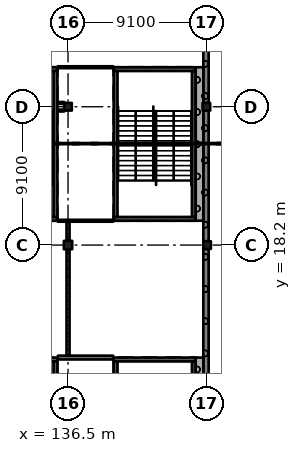
"""IFC4 building model, lengths in metres.
Left out: names, types, materials, properties, quantities, classifications, styles, units other than length and angle.
Written with IfcOpenShell. Run it as: python <this file> out.ifc"""

import sys

from ifc_helpers import new_model, si_unit, direction, frame, frame_2d, origin, origin_2d, place, context, subcontext, project, spatial, rectangle, extrude, element, fill, save


model = new_model("IFC4")
c1 = context("Model", 3, precision=1e-05, world=origin(), true_north=direction((0.0, 1.0)))
c2 = subcontext(c1, "Body", "Model", "MODEL_VIEW")
j1 = project(units=[si_unit("LENGTHUNIT", "METRE"), si_unit("PLANEANGLEUNIT", "RADIAN")], contexts=[c1])
p1 = place(None, origin())
s1 = spatial("IfcSite", under=j1, at=p1, CompositionType="ELEMENT")
p2 = place(p1, origin())
s2 = spatial("IfcBuilding", under=s1, at=p2, CompositionType="ELEMENT")
p3 = place(p2, frame((0.0, 0.0, 20.02)))
s3 = spatial("IfcBuildingStorey", under=s2, at=p3, CompositionType="ELEMENT", Elevation=20.02)
p4 = place(p3, frame((136.5, 18.2, 0.0), z_axis=(0.0, 0.0, 1.0), x_axis=(1.0, 0.0, 0.0)))
e1 = element("IfcColumn", 1, at=p4, inside=s3, PredefinedType="COLUMN", context=c2, shape_type="SweptSolid", body=[
    extrude(rectangle(XDim=0.55, YDim=0.55, at=origin_2d()), origin(), (0.0, 0.0, 1.0), 4.55),
])
for number, where, z_axis, x_axis in (
    (2, (136.5, 27.3, 0.0), (0.0, 0.0, 1.0), (1.0, 0.0, 0.0)),
    (3, (145.65, 18.2, 0.0), (0.0, 0.0, 1.0), (1.0, 0.0, 0.0)),
    (4, (145.6, 27.3, 0.0), (0.0, 0.0, 1.0), (1.0, 0.0, 0.0)),
):
    element("IfcColumn", number, at=place(p3, frame(where, z_axis=z_axis, x_axis=x_axis)), inside=s3, PredefinedType="COLUMN", context=c2, shape_type="SweptSolid", body=[
        extrude(rectangle(XDim=0.5, YDim=0.5, at=origin_2d()), origin(), (0.0, 0.0, 1.0), 4.55),
    ])
p5 = place(p3, frame((144.9, 10.675, 0.0), z_axis=(0.0, 0.0, 1.0), x_axis=(-1.0, 0.0, 0.0)))
e5 = element("IfcWall", 5, at=p5, inside=s3, PredefinedType="SHEAR", context=c2, shape_type="SweptSolid", body=[
    extrude(rectangle(XDim=5.4, YDim=0.25, at=frame_2d((2.7, 0.0))), origin(), (0.0, 0.0, 1.0), 4.55),
])
p6 = place(p5, frame((1.5, 0.0, 0.0)))
e6 = element("IfcOpeningElement", 6, at=p6, cuts=e5, PredefinedType="OPENING", context=c2, shape_type="SweptSolid", body=[
    extrude(rectangle(XDim=2.4, YDim=2.1, at=frame_2d((1.2, 1.05))), frame((0.0, 0.135, 0.0), z_axis=(0.0, -1.0, 0.0), x_axis=(1.0, 0.0, 0.0)), (0.0, 0.0, 1.0), 0.27),
])
for number, where, z_axis, x_axis in (
    (7, (139.625, 10.55, 0.0), (0.0, 0.0, 1.0), (0.0, -1.0, 0.0)),
    (8, (144.775, 10.55, 0.0), (0.0, 0.0, 1.0), (0.0, -1.0, 0.0)),
):
    element("IfcWall", number, at=place(p3, frame(where, z_axis=z_axis, x_axis=x_axis)), inside=s3, PredefinedType="SHEAR", context=c2, shape_type="SweptSolid", body=[
        extrude(rectangle(XDim=9.6, YDim=0.25, at=frame_2d((4.8, 0.0))), origin(), (0.0, 0.0, 1.0), 4.55),
    ])
p7 = place(p3, frame((135.8, 10.675, 0.0), z_axis=(0.0, 0.0, 1.0), x_axis=(-1.0, 0.0, 0.0)))
e9 = element("IfcWall", 9, at=p7, inside=s3, PredefinedType="SHEAR", context=c2, shape_type="SweptSolid", body=[
    extrude(rectangle(XDim=5.4, YDim=0.25, at=frame_2d((2.7, 0.0))), origin(), (0.0, 0.0, 1.0), 4.55),
])
p8 = place(p7, frame((1.5, 0.0, 0.0)))
e10 = element("IfcOpeningElement", 10, at=p8, cuts=e9, PredefinedType="OPENING", context=c2, shape_type="SweptSolid", body=[
    extrude(rectangle(XDim=2.4, YDim=2.1, at=frame_2d((1.2, 1.05))), frame((0.0, 0.135, 0.0), z_axis=(0.0, -1.0, 0.0), x_axis=(1.0, 0.0, 0.0)), (0.0, 0.0, 1.0), 0.27),
])
p9 = place(p3, frame((135.675, 10.55, 0.0), z_axis=(0.0, 0.0, 1.0), x_axis=(0.0, -1.0, 0.0)))
e11 = element("IfcWall", 11, at=p9, inside=s3, PredefinedType="SHEAR", context=c2, shape_type="SweptSolid", body=[
    extrude(rectangle(XDim=9.6, YDim=0.25, at=frame_2d((4.8, 0.0))), origin(), (0.0, 0.0, 1.0), 4.55),
])
p10 = place(p3, frame((144.9, 19.925, 0.0), z_axis=(0.0, 0.0, 1.0), x_axis=(-1.0, 0.0, 0.0)))
e12 = element("IfcWall", 12, at=p10, inside=s3, PredefinedType="SHEAR", context=c2, shape_type="SweptSolid", body=[
    extrude(rectangle(XDim=5.4, YDim=0.25, at=frame_2d((2.7, 0.0))), origin(), (0.0, 0.0, 1.0), 4.55),
])
p11 = place(p10, frame((1.5, 0.0, 0.0)))
e13 = element("IfcOpeningElement", 13, at=p11, cuts=e12, PredefinedType="OPENING", context=c2, shape_type="SweptSolid", body=[
    extrude(rectangle(XDim=2.4, YDim=2.1, at=frame_2d((1.2, 1.05))), frame((0.0, 0.135, 0.0), z_axis=(0.0, -1.0, 0.0), x_axis=(1.0, 0.0, 0.0)), (0.0, 0.0, 1.0), 0.27),
])
p12 = place(p3, frame((144.9, 29.775, 0.0), z_axis=(0.0, 0.0, 1.0), x_axis=(-1.0, 0.0, 0.0)))
e14 = element("IfcWall", 14, at=p12, inside=s3, PredefinedType="SHEAR", context=c2, shape_type="SweptSolid", body=[
    extrude(rectangle(XDim=5.4, YDim=0.25, at=frame_2d((2.7, 0.0))), origin(), (0.0, 0.0, 1.0), 4.55),
])
for number, where, z_axis, x_axis in (
    (15, (139.625, 29.65, 0.0), (0.0, 0.0, 1.0), (0.0, -1.0, 0.0)),
    (16, (144.775, 29.65, 0.0), (0.0, 0.0, 1.0), (0.0, -1.0, 0.0)),
):
    element("IfcWall", number, at=place(p3, frame(where, z_axis=z_axis, x_axis=x_axis)), inside=s3, PredefinedType="SHEAR", context=c2, shape_type="SweptSolid", body=[
        extrude(rectangle(XDim=9.6, YDim=0.25, at=frame_2d((4.8, 0.0))), origin(), (0.0, 0.0, 1.0), 4.55),
    ])
p13 = place(p3, frame((135.8, 19.925, 0.0), z_axis=(0.0, 0.0, 1.0), x_axis=(-1.0, 0.0, 0.0)))
e17 = element("IfcWall", 17, at=p13, inside=s3, PredefinedType="SHEAR", context=c2, shape_type="SweptSolid", body=[
    extrude(rectangle(XDim=5.4, YDim=0.25, at=frame_2d((2.7, 0.0))), origin(), (0.0, 0.0, 1.0), 4.55),
])
p14 = place(p13, frame((1.5, 0.0, 0.0)))
e18 = element("IfcOpeningElement", 18, at=p14, cuts=e17, PredefinedType="OPENING", context=c2, shape_type="SweptSolid", body=[
    extrude(rectangle(XDim=2.4, YDim=2.1, at=frame_2d((1.2, 1.05))), frame((0.0, 0.135, 0.0), z_axis=(0.0, -1.0, 0.0), x_axis=(1.0, 0.0, 0.0)), (0.0, 0.0, 1.0), 0.27),
])
p15 = place(p3, frame((135.8, 29.775, 0.0), z_axis=(0.0, 0.0, 1.0), x_axis=(-1.0, 0.0, 0.0)))
e19 = element("IfcWall", 19, at=p15, inside=s3, PredefinedType="SHEAR", context=c2, shape_type="SweptSolid", body=[
    extrude(rectangle(XDim=5.4, YDim=0.25, at=frame_2d((2.7, 0.0))), origin(), (0.0, 0.0, 1.0), 4.55),
])
p16 = place(p3, frame((135.675, 29.65, 0.0), z_axis=(0.0, 0.0, 1.0), x_axis=(0.0, -1.0, 0.0)))
e20 = element("IfcWall", 20, at=p16, inside=s3, PredefinedType="SHEAR", context=c2, shape_type="SweptSolid", body=[
    extrude(rectangle(XDim=9.6, YDim=0.25, at=frame_2d((4.8, 0.0))), origin(), (0.0, 0.0, 1.0), 4.55),
])
p17 = place(p3, frame((145.575, 9.35, 0.0), z_axis=(0.0, 0.0, 1.0), x_axis=(0.0, 1.0, 0.0)))
e21 = element("IfcWall", 21, at=p17, inside=s3, PredefinedType="SOLIDWALL", context=c2, shape_type="SweptSolid", body=[
    extrude(rectangle(XDim=8.6, YDim=0.35, at=frame_2d((4.3, 0.0))), origin(), (0.0, 0.0, 1.0), 3.5),
])
p18 = place(p3, frame((145.575, 18.45, 0.0), z_axis=(0.0, 0.0, 1.0), x_axis=(0.0, 1.0, 0.0)))
e22 = element("IfcWall", 22, at=p18, inside=s3, PredefinedType="SOLIDWALL", context=c2, shape_type="SweptSolid", body=[
    extrude(rectangle(XDim=8.6, YDim=0.35, at=frame_2d((4.3, 0.0))), origin(), (0.0, 0.0, 1.0), 3.5),
])
p19 = place(p3, frame((145.575, 27.55, 0.0), z_axis=(0.0, 0.0, 1.0), x_axis=(0.0, 1.0, 0.0)))
e23 = element("IfcWall", 23, at=p19, inside=s3, PredefinedType="SOLIDWALL", context=c2, shape_type="SweptSolid", body=[
    extrude(rectangle(XDim=8.6, YDim=0.35, at=frame_2d((4.3, 0.0))), origin(), (0.0, 0.0, 1.0), 3.5),
])
p20 = place(p3, frame((145.15, 0.7, 0.0), z_axis=(0.0, 0.0, 1.0), x_axis=(0.0, 1.0, 0.0)))
e24 = element("IfcWall", 24, at=p20, inside=s3, PredefinedType="SOLIDWALL", context=c2, shape_type="SweptSolid", body=[
    extrude(rectangle(XDim=10.1, YDim=0.5, at=frame_2d((5.05, 0.0))), origin(), (0.0, 0.0, 1.0), 4.55),
])
p21 = place(p3, frame((145.15, 19.8, 0.0), z_axis=(0.0, 0.0, 1.0), x_axis=(0.0, 1.0, 0.0)))
e25 = element("IfcWall", 25, at=p21, inside=s3, PredefinedType="SOLIDWALL", context=c2, shape_type="SweptSolid", body=[
    extrude(rectangle(XDim=10.1, YDim=0.5, at=frame_2d((5.05, 0.0))), origin(), (0.0, 0.0, 1.0), 4.55),
])
p22 = place(p3, frame((135.83, 19.8, 0.0), z_axis=(0.0, 0.0, 1.0), x_axis=(1.0, 0.0, 0.0)))
e26 = element("IfcWall", 26, at=p22, inside=s3, PredefinedType="PARTITIONING", context=c2, shape_type="SweptSolid", body=[
    extrude(rectangle(XDim=3.64, YDim=0.125, at=frame_2d((1.82, 0.0))), origin(), (0.0, 0.0, 1.0), 4.25),
])
p23 = place(p22, frame((1.72, 0.0, 0.0)))
e27 = element("IfcOpeningElement", 27, at=p23, cuts=e26, PredefinedType="OPENING", context=c2, shape_type="SweptSolid", body=[
    extrude(rectangle(XDim=0.9, YDim=2.1, at=frame_2d((0.45, 1.05))), frame((0.0, 0.073, 0.0), z_axis=(0.0, -1.0, 0.0), x_axis=(1.0, 0.0, 0.0)), (0.0, 0.0, 1.0), 0.145),
])
p24 = place(p3, frame((135.83, 27.05, 0.0), z_axis=(0.0, 0.0, 1.0), x_axis=(1.0, 0.0, 0.0)))
e28 = element("IfcWall", 28, at=p24, inside=s3, PredefinedType="PARTITIONING", context=c2, shape_type="SweptSolid", body=[
    extrude(rectangle(XDim=0.42, YDim=0.125, at=frame_2d((0.21, 0.0))), origin(), (0.0, 0.0, 1.0), 4.25),
])
p25 = place(p3, frame((135.83, 29.9, 0.0), z_axis=(0.0, 0.0, 1.0), x_axis=(1.0, 0.0, 0.0)))
e29 = element("IfcWall", 29, at=p25, inside=s3, PredefinedType="PARTITIONING", context=c2, shape_type="SweptSolid", body=[
    extrude(rectangle(XDim=3.64, YDim=0.125, at=frame_2d((1.82, 0.0))), origin(), (0.0, 0.0, 1.0), 4.25),
])
p26 = place(p3, frame((136.25, 27.55, 0.0), z_axis=(0.0, 0.0, 1.0), x_axis=(-1.0, 0.0, 0.0)))
e30 = element("IfcWall", 30, at=p26, inside=s3, PredefinedType="PARTITIONING", context=c2, shape_type="SweptSolid", body=[
    extrude(rectangle(XDim=0.42, YDim=0.125, at=frame_2d((0.21, 0.0))), origin(), (0.0, 0.0, 1.0), 4.25),
])
p27 = place(p3, frame((135.83, 10.8, 0.0), z_axis=(0.0, 0.0, 1.0), x_axis=(1.0, 0.0, 0.0)))
e31 = element("IfcWall", 31, at=p27, inside=s3, PredefinedType="SOLIDWALL", context=c2, shape_type="SweptSolid", body=[
    extrude(rectangle(XDim=3.64, YDim=0.25, at=frame_2d((1.82, 0.0))), origin(), (0.0, 0.0, 1.0), 4.25),
])
p28 = place(p27, frame((1.79, 0.0, 0.0)))
e32 = element("IfcOpeningElement", 32, at=p28, cuts=e31, PredefinedType="OPENING", context=c2, shape_type="SweptSolid", body=[
    extrude(rectangle(XDim=0.8, YDim=2.1, at=frame_2d((0.4, 1.05))), frame((0.0, 0.135, 0.0), z_axis=(0.0, -1.0, 0.0), x_axis=(1.0, 0.0, 0.0)), (0.0, 0.0, 1.0), 0.27),
])
p29 = place(p3, frame((136.5, 10.925, 0.0), z_axis=(0.0, 0.0, 1.0), x_axis=(0.0, 1.0, 0.0)))
e33 = element("IfcWall", 33, at=p29, inside=s3, PredefinedType="PARTITIONING", context=c2, shape_type="SweptSolid", body=[
    extrude(rectangle(XDim=7.0, YDim=0.2, at=frame_2d((3.5, 0.0))), origin(), (0.0, 0.0, 1.0), 3.5),
])
p30 = place(p29, frame((0.85, 0.0, 0.0)))
e34 = element("IfcOpeningElement", 34, at=p30, cuts=e33, PredefinedType="OPENING", context=c2, shape_type="SweptSolid", body=[
    extrude(rectangle(XDim=1.8, YDim=2.4, at=frame_2d((0.9, 1.2))), frame((0.0, 0.11, 0.0), z_axis=(0.0, -1.0, 0.0), x_axis=(1.0, 0.0, 0.0)), (0.0, 0.0, 1.0), 0.22),
])
p31 = place(p29, frame((4.35, 0.0, 0.0)))
e35 = element("IfcOpeningElement", 35, at=p31, cuts=e33, PredefinedType="OPENING", context=c2, shape_type="SweptSolid", body=[
    extrude(rectangle(XDim=1.8, YDim=2.4, at=frame_2d((0.9, 1.2))), frame((0.0, 0.11, 0.0), z_axis=(0.0, -1.0, 0.0), x_axis=(1.0, 0.0, 0.0)), (0.0, 0.0, 1.0), 0.22),
])
p32 = place(p3, frame((136.5, 18.475, 0.0), z_axis=(0.0, 0.0, 1.0), x_axis=(0.0, 1.0, 0.0)))
e36 = element("IfcWall", 36, at=p32, inside=s3, PredefinedType="PARTITIONING", context=c2, shape_type="SweptSolid", body=[
    extrude(rectangle(XDim=1.262, YDim=0.2, at=frame_2d((0.631, 0.0))), origin(), (0.0, 0.0, 1.0), 3.5),
])
p33 = place(p23, origin())
e37 = element("IfcDoor", 37, at=p33, inside=s3, OperationType="SINGLE_SWING_LEFT", PredefinedType="DOOR", context=c2, shape_type="SweptSolid", body=[
    extrude(rectangle(XDim=0.9, YDim=2.1, at=frame_2d((0.45, 1.05))), frame((0.0, 0.025, 0.0), z_axis=(0.0, -1.0, 0.0), x_axis=(1.0, 0.0, 0.0)), (0.0, 0.0, 1.0), 0.05),
])
fill(e27, e37)
p34 = place(p28, origin())
e38 = element("IfcDoor", 38, at=p34, inside=s3, OperationType="SINGLE_SWING_RIGHT", PredefinedType="DOOR", context=c2, shape_type="SweptSolid", body=[
    extrude(rectangle(XDim=0.8, YDim=2.1, at=frame_2d((0.4, 1.05))), frame((0.0, 0.025, 0.0), z_axis=(0.0, -1.0, 0.0), x_axis=(1.0, 0.0, 0.0)), (0.0, 0.0, 1.0), 0.05),
])
fill(e32, e38)
p35 = place(p30, origin())
e39 = element("IfcDoor", 39, at=p35, inside=s3, OperationType="DOUBLE_DOOR_SINGLE_SWING", PredefinedType="DOOR", context=c2, shape_type="SweptSolid", body=[
    extrude(rectangle(XDim=1.8, YDim=2.4, at=frame_2d((0.9, 1.2))), frame((0.0, 0.025, 0.0), z_axis=(0.0, -1.0, 0.0), x_axis=(1.0, 0.0, 0.0)), (0.0, 0.0, 1.0), 0.05),
])
fill(e34, e39)
p36 = place(p31, origin())
e40 = element("IfcDoor", 40, at=p36, inside=s3, OperationType="DOUBLE_DOOR_SINGLE_SWING", PredefinedType="DOOR", context=c2, shape_type="SweptSolid", body=[
    extrude(rectangle(XDim=1.8, YDim=2.4, at=frame_2d((0.9, 1.2))), frame((0.0, 0.025, 0.0), z_axis=(0.0, -1.0, 0.0), x_axis=(1.0, 0.0, 0.0)), (0.0, 0.0, 1.0), 0.05),
])
fill(e35, e40)
p37 = place(p6, origin())
e41 = element("IfcDoor", 41, at=p37, inside=s3, OperationType="DOUBLE_DOOR_SINGLE_SWING", PredefinedType="DOOR", context=c2, shape_type="SweptSolid", body=[
    extrude(rectangle(XDim=2.4, YDim=2.1, at=frame_2d((1.2, 1.05))), frame((0.0, 0.025, 0.0), z_axis=(0.0, -1.0, 0.0), x_axis=(1.0, 0.0, 0.0)), (0.0, 0.0, 1.0), 0.05),
])
fill(e6, e41)
p38 = place(p11, origin())
e42 = element("IfcDoor", 42, at=p38, inside=s3, OperationType="DOUBLE_DOOR_SINGLE_SWING", PredefinedType="DOOR", context=c2, shape_type="SweptSolid", body=[
    extrude(rectangle(XDim=2.4, YDim=2.1, at=frame_2d((1.2, 1.05))), frame((0.0, 0.025, 0.0), z_axis=(0.0, -1.0, 0.0), x_axis=(1.0, 0.0, 0.0)), (0.0, 0.0, 1.0), 0.05),
])
fill(e13, e42)
save(model, sys.argv[1])
